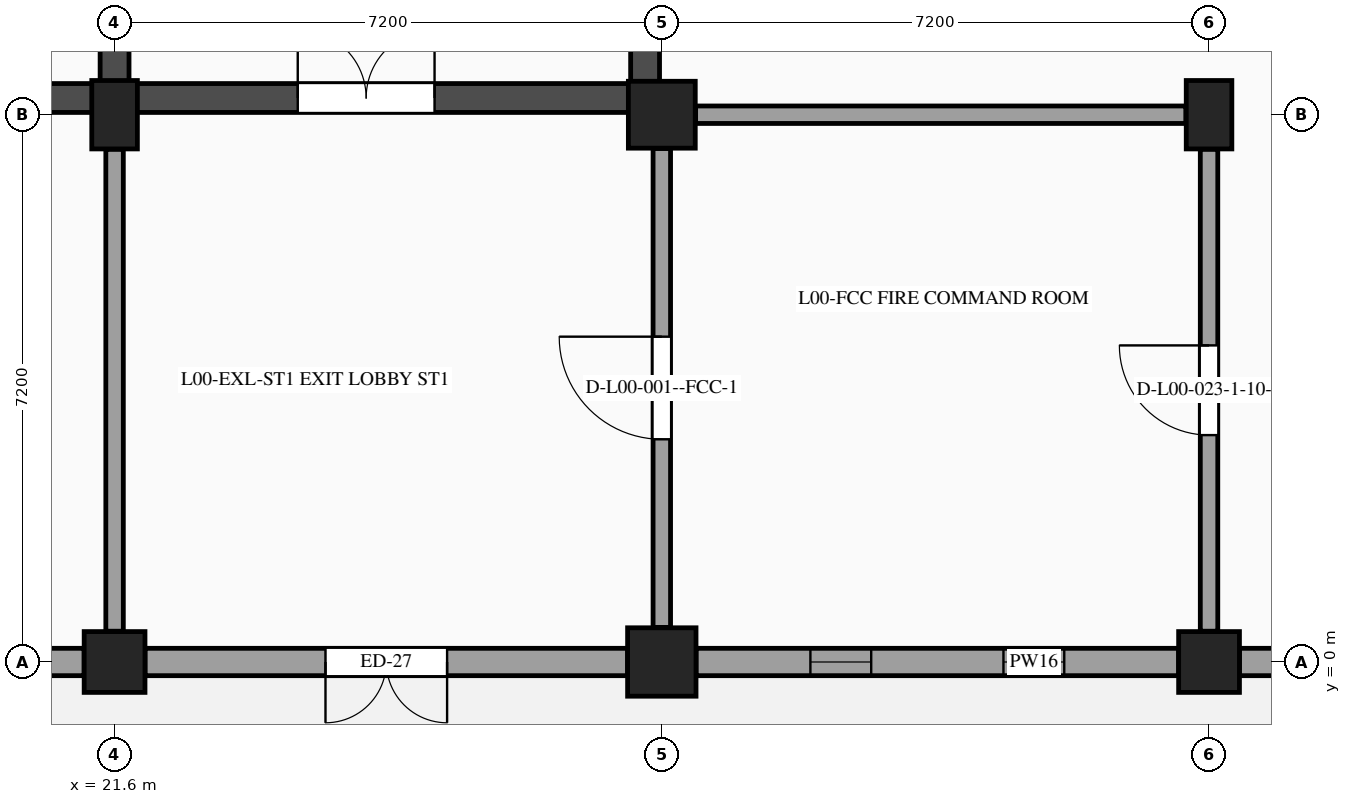
"""IFC4 building model, lengths in metres.
Left out: names, types, materials, properties, quantities, classifications, styles, units other than length and angle.
Written with IfcOpenShell. Run it as: python <this file> out.ifc"""

import sys

from ifc_helpers import new_model, si_unit, direction, frame, frame_2d, origin, origin_2d, place, context, subcontext, project, spatial, rectangle, extrude, element, fill, save


model = new_model("IFC4")
c1 = context("Model", 3, precision=1e-05, world=origin(), true_north=direction((0.0, 1.0)))
c2 = subcontext(c1, "Body", "Model", "MODEL_VIEW")
j1 = project(units=[si_unit("LENGTHUNIT", "METRE"), si_unit("PLANEANGLEUNIT", "RADIAN")], contexts=[c1])
p1 = place(None, origin())
s1 = spatial("IfcSite", under=j1, at=p1, CompositionType="ELEMENT")
p2 = place(p1, origin())
s2 = spatial("IfcBuilding", under=s1, at=p2, CompositionType="ELEMENT")
p3 = place(p2, origin())
s3 = spatial("IfcBuildingStorey", under=s2, at=p3, CompositionType="ELEMENT", Elevation=0.0)
p4 = place(p3, frame((21.6, 0.0, 0.0), z_axis=(0.0, 0.0, 1.0), x_axis=(1.0, 0.0, 0.0)))
e1 = element("IfcColumn", 1, at=p4, inside=s3, PredefinedType="COLUMN", context=c2, shape_type="SweptSolid", body=[
    extrude(rectangle(XDim=0.8, YDim=0.8, at=origin_2d()), origin(), (0.0, 0.0, 1.0), 5.4),
])
p5 = place(p3, frame((21.6, 7.2, 0.0), z_axis=(0.0, 0.0, 1.0), x_axis=(1.0, 0.0, 0.0)))
e2 = element("IfcColumn", 2, at=p5, inside=s3, PredefinedType="COLUMN", context=c2, shape_type="SweptSolid", body=[
    extrude(rectangle(XDim=0.6, YDim=0.9, at=origin_2d()), origin(), (0.0, 0.0, 1.0), 5.4),
])
p6 = place(p3, frame((28.8, 0.0, 0.0), z_axis=(0.0, 0.0, 1.0), x_axis=(1.0, 0.0, 0.0)))
e3 = element("IfcColumn", 3, at=p6, inside=s3, PredefinedType="COLUMN", context=c2, shape_type="SweptSolid", body=[
    extrude(rectangle(XDim=0.9, YDim=0.9, at=origin_2d()), origin(), (0.0, 0.0, 1.0), 5.4),
])
p7 = place(p3, frame((28.8, 7.2, 0.0), z_axis=(0.0, 0.0, 1.0), x_axis=(1.0, 0.0, 0.0)))
e4 = element("IfcColumn", 4, at=p7, inside=s3, PredefinedType="COLUMN", context=c2, shape_type="SweptSolid", body=[
    extrude(rectangle(XDim=0.88, YDim=0.88, at=origin_2d()), origin(), (0.0, 0.0, 1.0), 5.4),
])
p8 = place(p3, frame((36.0, 0.0, 0.0), z_axis=(0.0, 0.0, 1.0), x_axis=(1.0, 0.0, 0.0)))
e5 = element("IfcColumn", 5, at=p8, inside=s3, PredefinedType="COLUMN", context=c2, shape_type="SweptSolid", body=[
    extrude(rectangle(XDim=0.8, YDim=0.8, at=origin_2d()), origin(), (0.0, 0.0, 1.0), 5.4),
])
p9 = place(p3, frame((36.0, 7.2, 0.0), z_axis=(0.0, 0.0, 1.0), x_axis=(1.0, 0.0, 0.0)))
e6 = element("IfcColumn", 6, at=p9, inside=s3, PredefinedType="COLUMN", context=c2, shape_type="SweptSolid", body=[
    extrude(rectangle(XDim=0.6, YDim=0.9, at=origin_2d()), origin(), (0.0, 0.0, 1.0), 5.4),
])
p10 = place(p3, frame((42.75, 0.0, 0.0), z_axis=(0.0, 0.0, 1.0), x_axis=(-1.0, 0.0, 0.0)))
e7 = element("IfcWall", 7, at=p10, inside=s3, PredefinedType="STANDARD", context=c2, shape_type="SweptSolid", body=[
    extrude(rectangle(XDim=6.35, YDim=0.36, at=frame_2d((3.175, 0.0))), origin(), (0.0, 0.0, 1.0), 4.37),
])
p11 = place(p10, frame((1.23, 0.0, 1.15)))
e8 = element("IfcOpeningElement", 8, at=p11, cuts=e7, PredefinedType="OPENING", context=c2, shape_type="SweptSolid", body=[
    extrude(rectangle(XDim=1.35, YDim=1.1, at=frame_2d((0.675, 0.55))), frame((0.0, 0.19, 0.0), z_axis=(0.0, -1.0, 0.0), x_axis=(1.0, 0.0, 0.0)), (0.0, 0.0, 1.0), 0.38),
])
p12 = place(p10, frame((3.77, 0.0, 1.15)))
e9 = element("IfcOpeningElement", 9, at=p12, cuts=e7, PredefinedType="OPENING", context=c2, shape_type="SweptSolid", body=[
    extrude(rectangle(XDim=1.35, YDim=1.1, at=frame_2d((0.675, 0.55))), frame((0.0, 0.19, 0.0), z_axis=(0.0, -1.0, 0.0), x_axis=(1.0, 0.0, 0.0)), (0.0, 0.0, 1.0), 0.38),
])
p13 = place(p3, frame((35.6, 0.0, 0.0), z_axis=(0.0, 0.0, 1.0), x_axis=(-1.0, 0.0, 0.0)))
e10 = element("IfcWall", 10, at=p13, inside=s3, PredefinedType="STANDARD", context=c2, shape_type="SweptSolid", body=[
    extrude(rectangle(XDim=6.35, YDim=0.36, at=frame_2d((3.175, 0.0))), origin(), (0.0, 0.0, 1.0), 4.37),
])
p14 = place(p13, frame((1.505, 0.0, 1.15)))
e11 = element("IfcOpeningElement", 11, at=p14, cuts=e10, PredefinedType="OPENING", context=c2, shape_type="SweptSolid", body=[
    extrude(rectangle(XDim=0.8, YDim=1.5, at=frame_2d((0.4, 0.75))), frame((0.0, 0.19, 0.0), z_axis=(0.0, -1.0, 0.0), x_axis=(1.0, 0.0, 0.0)), (0.0, 0.0, 1.0), 0.38),
])
p15 = place(p13, frame((4.045, 0.0, 1.15)))
e12 = element("IfcOpeningElement", 12, at=p15, cuts=e10, PredefinedType="OPENING", context=c2, shape_type="SweptSolid", body=[
    extrude(rectangle(XDim=0.8, YDim=1.5, at=frame_2d((0.4, 0.75))), frame((0.0, 0.19, 0.0), z_axis=(0.0, -1.0, 0.0), x_axis=(1.0, 0.0, 0.0)), (0.0, 0.0, 1.0), 0.38),
])
p16 = place(p3, frame((28.35, 0.0, 0.0), z_axis=(0.0, 0.0, 1.0), x_axis=(-1.0, 0.0, 0.0)))
e13 = element("IfcWall", 13, at=p16, inside=s3, PredefinedType="STANDARD", context=c2, shape_type="SweptSolid", body=[
    extrude(rectangle(XDim=6.35, YDim=0.36, at=frame_2d((3.175, 0.0))), origin(), (0.0, 0.0, 1.0), 4.37),
])
p17 = place(p16, frame((2.375, 0.0, 0.0)))
e14 = element("IfcOpeningElement", 14, at=p17, cuts=e13, PredefinedType="OPENING", context=c2, shape_type="SweptSolid", body=[
    extrude(rectangle(XDim=1.6, YDim=2.3, at=frame_2d((0.8, 1.15))), frame((0.0, 0.19, 0.0), z_axis=(0.0, -1.0, 0.0), x_axis=(1.0, 0.0, 0.0)), (0.0, 0.0, 1.0), 0.38),
])
p18 = place(p3, frame((21.2, 0.0, 0.0), z_axis=(0.0, 0.0, 1.0), x_axis=(-1.0, 0.0, 0.0)))
e15 = element("IfcWall", 15, at=p18, inside=s3, PredefinedType="STANDARD", context=c2, shape_type="SweptSolid", body=[
    extrude(rectangle(XDim=6.35, YDim=0.36, at=frame_2d((3.175, 0.0))), origin(), (0.0, 0.0, 1.0), 4.37),
])
p19 = place(p18, frame((1.03, 0.0, 1.15)))
e16 = element("IfcOpeningElement", 16, at=p19, cuts=e15, PredefinedType="OPENING", context=c2, shape_type="SweptSolid", body=[
    extrude(rectangle(XDim=1.75, YDim=1.4, at=frame_2d((0.875, 0.7))), frame((0.0, 0.19, 0.0), z_axis=(0.0, -1.0, 0.0), x_axis=(1.0, 0.0, 0.0)), (0.0, 0.0, 1.0), 0.38),
])
p20 = place(p18, frame((3.57, 0.0, 1.15)))
e17 = element("IfcOpeningElement", 17, at=p20, cuts=e15, PredefinedType="OPENING", context=c2, shape_type="SweptSolid", body=[
    extrude(rectangle(XDim=1.75, YDim=1.4, at=frame_2d((0.875, 0.7))), frame((0.0, 0.19, 0.0), z_axis=(0.0, -1.0, 0.0), x_axis=(1.0, 0.0, 0.0)), (0.0, 0.0, 1.0), 0.38),
])
p21 = place(p3, frame((14.81, 7.42, 0.0), z_axis=(0.0, 0.0, 1.0), x_axis=(1.0, 0.0, 0.0)))
e18 = element("IfcWall", 18, at=p21, inside=s3, PredefinedType="SHEAR", context=c2, shape_type="SweptSolid", body=[
    extrude(rectangle(XDim=6.6, YDim=0.38, at=frame_2d((3.3, 0.0))), origin(), (0.0, 0.0, 1.0), 5.09),
])
p22 = place(p3, frame((21.6, 7.23, 0.0), z_axis=(0.0, 0.0, 1.0), x_axis=(0.0, 1.0, 0.0)))
e19 = element("IfcWall", 19, at=p22, inside=s3, PredefinedType="SHEAR", context=c2, shape_type="SweptSolid", body=[
    extrude(rectangle(XDim=7.14, YDim=0.38, at=frame_2d((3.57, 0.0))), origin(), (0.0, 0.0, 1.0), 5.09),
])
p23 = place(p22, frame((1.4, 0.0, 0.0)))
e20 = element("IfcOpeningElement", 20, at=p23, cuts=e19, PredefinedType="OPENING", context=c2, shape_type="SweptSolid", body=[
    extrude(rectangle(XDim=1.8, YDim=2.2, at=frame_2d((0.9, 1.1))), frame((0.0, 0.2, 0.0), z_axis=(0.0, -1.0, 0.0), x_axis=(1.0, 0.0, 0.0)), (0.0, 0.0, 1.0), 0.4),
])
p24 = place(p3, frame((21.79, 7.42, 0.0), z_axis=(0.0, 0.0, 1.0), x_axis=(1.0, 0.0, 0.0)))
e21 = element("IfcWall", 21, at=p24, inside=s3, PredefinedType="SHEAR", context=c2, shape_type="SweptSolid", body=[
    extrude(rectangle(XDim=6.6, YDim=0.38, at=frame_2d((3.3, 0.0))), origin(), (0.0, 0.0, 1.0), 5.09),
])
p25 = place(p24, frame((2.22, 0.0, 0.0)))
e22 = element("IfcOpeningElement", 22, at=p25, cuts=e21, PredefinedType="OPENING", context=c2, shape_type="SweptSolid", body=[
    extrude(rectangle(XDim=1.8, YDim=2.2, at=frame_2d((0.9, 1.1))), frame((0.0, 0.2, 0.0), z_axis=(0.0, -1.0, 0.0), x_axis=(1.0, 0.0, 0.0)), (0.0, 0.0, 1.0), 0.4),
])
p26 = place(p3, frame((28.58, 7.23, 0.0), z_axis=(0.0, 0.0, 1.0), x_axis=(0.0, 1.0, 0.0)))
e23 = element("IfcWall", 23, at=p26, inside=s3, PredefinedType="SHEAR", context=c2, shape_type="SweptSolid", body=[
    extrude(rectangle(XDim=7.14, YDim=0.38, at=frame_2d((3.57, 0.0))), origin(), (0.0, 0.0, 1.0), 5.09),
])
p27 = place(p3, frame((21.6, 0.405, 0.0), z_axis=(0.0, 0.0, 1.0), x_axis=(0.0, 1.0, 0.0)))
e24 = element("IfcWall", 24, at=p27, inside=s3, PredefinedType="PARTITIONING", context=c2, shape_type="SweptSolid", body=[
    extrude(rectangle(XDim=6.34, YDim=0.23, at=frame_2d((3.17, 0.0))), origin(), (0.0, 0.0, 1.0), 4.455),
])
p28 = place(p3, frame((28.8, 0.455, 0.0), z_axis=(0.0, 0.0, 1.0), x_axis=(0.0, 1.0, 0.0)))
e25 = element("IfcWall", 25, at=p28, inside=s3, PredefinedType="PARTITIONING", context=c2, shape_type="SweptSolid", body=[
    extrude(rectangle(XDim=6.3, YDim=0.23, at=frame_2d((3.15, 0.0))), origin(), (0.0, 0.0, 1.0), 4.455),
])
p29 = place(p28, frame((2.475, 0.0, 0.0)))
e26 = element("IfcOpeningElement", 26, at=p29, cuts=e25, PredefinedType="OPENING", context=c2, shape_type="SweptSolid", body=[
    extrude(rectangle(XDim=1.35, YDim=2.15, at=frame_2d((0.675, 1.075))), frame((0.0, 0.125, 0.0), z_axis=(0.0, -1.0, 0.0), x_axis=(1.0, 0.0, 0.0)), (0.0, 0.0, 1.0), 0.25),
])
p30 = place(p3, frame((36.0, 0.405, 0.0), z_axis=(0.0, 0.0, 1.0), x_axis=(0.0, 1.0, 0.0)))
e27 = element("IfcWall", 27, at=p30, inside=s3, PredefinedType="PARTITIONING", context=c2, shape_type="SweptSolid", body=[
    extrude(rectangle(XDim=6.34, YDim=0.23, at=frame_2d((3.17, 0.0))), origin(), (0.0, 0.0, 1.0), 4.455),
])
p31 = place(p30, frame((2.58, 0.0, 0.0)))
e28 = element("IfcOpeningElement", 28, at=p31, cuts=e27, PredefinedType="OPENING", context=c2, shape_type="SweptSolid", body=[
    extrude(rectangle(XDim=1.18, YDim=2.18, at=frame_2d((0.59, 1.09))), frame((0.0, 0.125, 0.0), z_axis=(0.0, -1.0, 0.0), x_axis=(1.0, 0.0, 0.0)), (0.0, 0.0, 1.0), 0.25),
])
p32 = place(p3, frame((29.245, 7.2, 0.0), z_axis=(0.0, 0.0, 1.0), x_axis=(1.0, 0.0, 0.0)))
e29 = element("IfcWall", 29, at=p32, inside=s3, PredefinedType="PARTITIONING", context=c2, shape_type="SweptSolid", body=[
    extrude(rectangle(XDim=6.45, YDim=0.23, at=frame_2d((3.225, 0.0))), origin(), (0.0, 0.0, 1.0), 4.37),
])
p33 = place(p14, origin())
e30 = element("IfcWindow", 30, at=p33, inside=s3, PartitioningType="SINGLE_PANEL", PredefinedType="WINDOW", context=c2, shape_type="SweptSolid", body=[
    extrude(rectangle(XDim=0.8, YDim=1.5, at=frame_2d((0.4, 0.75))), frame((0.0, -0.08, 0.0), z_axis=(0.0, -1.0, 0.0), x_axis=(1.0, 0.0, 0.0)), (0.0, 0.0, 1.0), 0.06),
])
fill(e11, e30)
p34 = place(p15, origin())
e31 = element("IfcWindow", 31, at=p34, inside=s3, PartitioningType="SINGLE_PANEL", PredefinedType="WINDOW", context=c2, shape_type="SweptSolid", body=[
    extrude(rectangle(XDim=0.8, YDim=1.5, at=frame_2d((0.4, 0.75))), frame((0.0, -0.08, 0.0), z_axis=(0.0, -1.0, 0.0), x_axis=(1.0, 0.0, 0.0)), (0.0, 0.0, 1.0), 0.06),
])
fill(e12, e31)
p35 = place(p17, origin())
e32 = element("IfcDoor", 32, at=p35, inside=s3, OperationType="DOUBLE_DOOR_SINGLE_SWING", PredefinedType="DOOR", context=c2, shape_type="SweptSolid", body=[
    extrude(rectangle(XDim=1.6, YDim=2.3, at=frame_2d((0.8, 1.15))), frame((0.0, 0.025, 0.0), z_axis=(0.0, -1.0, 0.0), x_axis=(1.0, 0.0, 0.0)), (0.0, 0.0, 1.0), 0.05),
])
fill(e14, e32)
p36 = place(p25, frame((1.8, 0.0, 0.0), z_axis=(0.0, 0.0, 1.0), x_axis=(-1.0, 0.0, 0.0)))
e33 = element("IfcDoor", 33, at=p36, inside=s3, OperationType="DOUBLE_DOOR_SINGLE_SWING", PredefinedType="DOOR", context=c2, shape_type="SweptSolid", body=[
    extrude(rectangle(XDim=1.8, YDim=2.2, at=frame_2d((0.9, 1.1))), frame((0.0, 0.025, 0.0), z_axis=(0.0, -1.0, 0.0), x_axis=(1.0, 0.0, 0.0)), (0.0, 0.0, 1.0), 0.05),
])
fill(e22, e33)
p37 = place(p29, origin())
e34 = element("IfcDoor", 34, at=p37, inside=s3, OperationType="SINGLE_SWING_RIGHT", PredefinedType="DOOR", context=c2, shape_type="SweptSolid", body=[
    extrude(rectangle(XDim=1.35, YDim=2.15, at=frame_2d((0.675, 1.075))), frame((0.0, 0.025, 0.0), z_axis=(0.0, -1.0, 0.0), x_axis=(1.0, 0.0, 0.0)), (0.0, 0.0, 1.0), 0.05),
])
fill(e26, e34)
p38 = place(p31, origin())
e35 = element("IfcDoor", 35, at=p38, inside=s3, OperationType="SINGLE_SWING_RIGHT", PredefinedType="DOOR", context=c2, shape_type="SweptSolid", body=[
    extrude(rectangle(XDim=1.18, YDim=2.18, at=frame_2d((0.59, 1.09))), frame((0.0, 0.025, 0.0), z_axis=(0.0, -1.0, 0.0), x_axis=(1.0, 0.0, 0.0)), (0.0, 0.0, 1.0), 0.05),
])
fill(e28, e35)
save(model, sys.argv[1])
